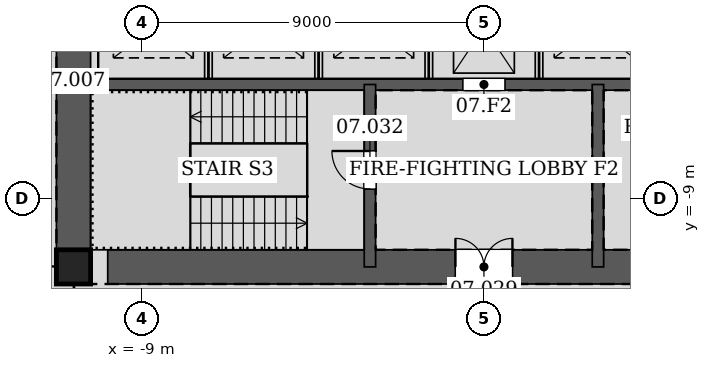
"""IFC4 building model, lengths in metres.
Left out: names, types, materials, properties, quantities, classifications, styles, units other than length and angle.
Written with IfcOpenShell. Run it as: python <this file> out.ifc"""

import sys

from ifc_helpers import new_model, si_unit, direction, frame, frame_2d, origin, origin_2d, place, context, subcontext, project, spatial, rectangle, hollow_rectangle, extrude, element, fill, save


model = new_model("IFC4")
c1 = context("Model", 3, precision=1e-05, world=origin(), true_north=direction((0.0, 1.0)))
c2 = subcontext(c1, "Body", "Model", "MODEL_VIEW")
j1 = project(units=[si_unit("LENGTHUNIT", "METRE"), si_unit("PLANEANGLEUNIT", "RADIAN")], contexts=[c1])
p1 = place(None, origin())
s1 = spatial("IfcSite", under=j1, at=p1, CompositionType="ELEMENT")
p2 = place(p1, origin())
s2 = spatial("IfcBuilding", under=s1, at=p2, CompositionType="ELEMENT")
p3 = place(p2, frame((0.0, 0.0, 37.2)))
s3 = spatial("IfcBuildingStorey", under=s2, at=p3, CompositionType="ELEMENT", Elevation=37.2)
p4 = place(p3, frame((-10.8, -10.8, 0.0), z_axis=(0.0, 0.0, 1.0), x_axis=(1.0, 0.0, 0.0)))
e1 = element("IfcColumn", 1, at=p4, inside=s3, PredefinedType="COLUMN", context=c2, shape_type="SweptSolid", body=[
    extrude(hollow_rectangle(XDim=0.9, YDim=0.9, WallThickness=0.06, at=origin_2d()), origin(), (0.0, 0.0, 1.0), 4.2),
])
p5 = place(p3, frame((-10.8, -10.8, 0.0), z_axis=(0.0, 0.0, 1.0), x_axis=(1.0, 0.0, 0.0)))
e2 = element("IfcWall", 2, at=p5, inside=s3, PredefinedType="SOLIDWALL", context=c2, shape_type="SweptSolid", body=[
    extrude(rectangle(XDim=21.6, YDim=0.9, at=frame_2d((10.8, 0.0))), origin(), (0.0, 0.0, 1.0), 4.2),
])
p6 = place(p5, frame((10.05, 0.0, 0.0)))
e3 = element("IfcOpeningElement", 3, at=p6, cuts=e2, PredefinedType="OPENING", context=c2, shape_type="SweptSolid", body=[
    extrude(rectangle(XDim=1.5, YDim=2.1, at=frame_2d((0.75, 1.05))), frame((0.0, 0.46, 0.0), z_axis=(0.0, -1.0, 0.0), x_axis=(1.0, 0.0, 0.0)), (0.0, 0.0, 1.0), 0.92),
])
p7 = place(p5, frame((17.1, 0.0, 0.0)))
e4 = element("IfcOpeningElement", 4, at=p7, cuts=e2, PredefinedType="OPENING", context=c2, shape_type="SweptSolid", body=[
    extrude(rectangle(XDim=0.9, YDim=2.1, at=frame_2d((0.45, 1.05))), frame((0.0, 0.46, 0.0), z_axis=(0.0, -1.0, 0.0), x_axis=(1.0, 0.0, 0.0)), (0.0, 0.0, 1.0), 0.92),
])
p8 = place(p3, frame((-10.8, 10.8, 0.0), z_axis=(0.0, 0.0, 1.0), x_axis=(0.0, -1.0, 0.0)))
e5 = element("IfcWall", 5, at=p8, inside=s3, PredefinedType="SOLIDWALL", context=c2, shape_type="SweptSolid", body=[
    extrude(rectangle(XDim=21.6, YDim=0.9, at=frame_2d((10.8, 0.0))), origin(), (0.0, 0.0, 1.0), 4.2),
])
p9 = place(p8, frame((8.7, 0.0, 0.0)))
e6 = element("IfcOpeningElement", 6, at=p9, cuts=e5, PredefinedType="OPENING", context=c2, shape_type="SweptSolid", body=[
    extrude(rectangle(XDim=1.2, YDim=2.1, at=frame_2d((0.6, 1.05))), frame((0.0, 0.46, 0.0), z_axis=(0.0, -1.0, 0.0), x_axis=(1.0, 0.0, 0.0)), (0.0, 0.0, 1.0), 0.92),
])
p10 = place(p8, frame((11.7, 0.0, 0.0)))
e7 = element("IfcOpeningElement", 7, at=p10, cuts=e5, PredefinedType="OPENING", context=c2, shape_type="SweptSolid", body=[
    extrude(rectangle(XDim=1.2, YDim=2.1, at=frame_2d((0.6, 1.05))), frame((0.0, 0.46, 0.0), z_axis=(0.0, -1.0, 0.0), x_axis=(1.0, 0.0, 0.0)), (0.0, 0.0, 1.0), 0.92),
])
p11 = place(p3, frame((-10.8, -6.0, 0.0), z_axis=(0.0, 0.0, 1.0), x_axis=(1.0, 0.0, 0.0)))
e8 = element("IfcWall", 8, at=p11, inside=s3, PredefinedType="SOLIDWALL", context=c2, shape_type="SweptSolid", body=[
    extrude(rectangle(XDim=21.6, YDim=0.3, at=frame_2d((10.8, 0.0))), origin(), (0.0, 0.0, 1.0), 4.2),
])
p12 = place(p11, frame((10.25, 0.0, 0.0)))
e9 = element("IfcOpeningElement", 9, at=p12, cuts=e8, PredefinedType="OPENING", context=c2, shape_type="SweptSolid", body=[
    extrude(rectangle(XDim=1.1, YDim=2.1, at=frame_2d((0.55, 1.05))), frame((0.0, 0.16, 0.0), z_axis=(0.0, -1.0, 0.0), x_axis=(1.0, 0.0, 0.0)), (0.0, 0.0, 1.0), 0.32),
])
p13 = place(p3, frame((-3.0, -6.0, 0.0), z_axis=(0.0, 0.0, 1.0), x_axis=(0.0, -1.0, 0.0)))
e10 = element("IfcWall", 10, at=p13, inside=s3, PredefinedType="SOLIDWALL", context=c2, shape_type="SweptSolid", body=[
    extrude(rectangle(XDim=4.8, YDim=0.3, at=frame_2d((2.4, 0.0))), origin(), (0.0, 0.0, 1.0), 4.2),
])
p14 = place(p13, frame((1.75, 0.0, 0.0)))
e11 = element("IfcOpeningElement", 11, at=p14, cuts=e10, PredefinedType="OPENING", context=c2, shape_type="SweptSolid", body=[
    extrude(rectangle(XDim=1.0, YDim=2.1, at=frame_2d((0.5, 1.05))), frame((0.0, 0.16, 0.0), z_axis=(0.0, -1.0, 0.0), x_axis=(1.0, 0.0, 0.0)), (0.0, 0.0, 1.0), 0.32),
])
p15 = place(p3, frame((3.0, -6.0, 0.0), z_axis=(0.0, 0.0, 1.0), x_axis=(0.0, -1.0, 0.0)))
e12 = element("IfcWall", 12, at=p15, inside=s3, PredefinedType="SOLIDWALL", context=c2, shape_type="SweptSolid", body=[
    extrude(rectangle(XDim=4.8, YDim=0.3, at=frame_2d((2.4, 0.0))), origin(), (0.0, 0.0, 1.0), 4.2),
])
for number, where, z_axis, x_axis in (
    (13, (-7.25, -5.85, 0.0), (0.0, 0.0, 1.0), (0.0, 1.0, 0.0)),
    (14, (-4.35, -5.85, 0.0), (0.0, 0.0, 1.0), (0.0, 1.0, 0.0)),
    (15, (-1.45, -5.85, 0.0), (0.0, 0.0, 1.0), (0.0, 1.0, 0.0)),
    (16, (1.45, -5.85, 0.0), (0.0, 0.0, 1.0), (0.0, 1.0, 0.0)),
):
    element("IfcWall", number, at=place(p3, frame(where, z_axis=z_axis, x_axis=x_axis)), inside=s3, PredefinedType="PARTITIONING", context=c2, shape_type="SweptSolid", body=[
        extrude(rectangle(XDim=2.7, YDim=0.2, at=frame_2d((1.35, 0.0))), origin(), (0.0, 0.0, 1.0), 4.2),
    ])
p16 = place(p6, origin())
e17 = element("IfcDoor", 17, at=p16, inside=s3, OperationType="DOUBLE_DOOR_SINGLE_SWING", PredefinedType="DOOR", context=c2, shape_type="SweptSolid", body=[
    extrude(rectangle(XDim=1.5, YDim=2.1, at=frame_2d((0.75, 1.05))), frame((0.0, 0.025, 0.0), z_axis=(0.0, -1.0, 0.0), x_axis=(1.0, 0.0, 0.0)), (0.0, 0.0, 1.0), 0.05),
])
fill(e3, e17)
p17 = place(p14, frame((1.0, 0.0, 0.0), z_axis=(0.0, 0.0, 1.0), x_axis=(-1.0, 0.0, 0.0)))
e18 = element("IfcDoor", 18, at=p17, inside=s3, OperationType="SINGLE_SWING_RIGHT", PredefinedType="DOOR", context=c2, shape_type="SweptSolid", body=[
    extrude(rectangle(XDim=1.0, YDim=2.1, at=frame_2d((0.5, 1.05))), frame((0.0, 0.025, 0.0), z_axis=(0.0, -1.0, 0.0), x_axis=(1.0, 0.0, 0.0)), (0.0, 0.0, 1.0), 0.05),
])
fill(e11, e18)
p18 = place(p12, origin())
e19 = element("IfcDoor", 19, at=p18, inside=s3, OperationType="DOUBLE_DOOR_SLIDING", PredefinedType="DOOR", context=c2, shape_type="SweptSolid", body=[
    extrude(rectangle(XDim=1.1, YDim=2.1, at=frame_2d((0.55, 1.05))), frame((0.0, 0.025, 0.0), z_axis=(0.0, -1.0, 0.0), x_axis=(1.0, 0.0, 0.0)), (0.0, 0.0, 1.0), 0.05),
])
fill(e9, e19)
save(model, sys.argv[1])
